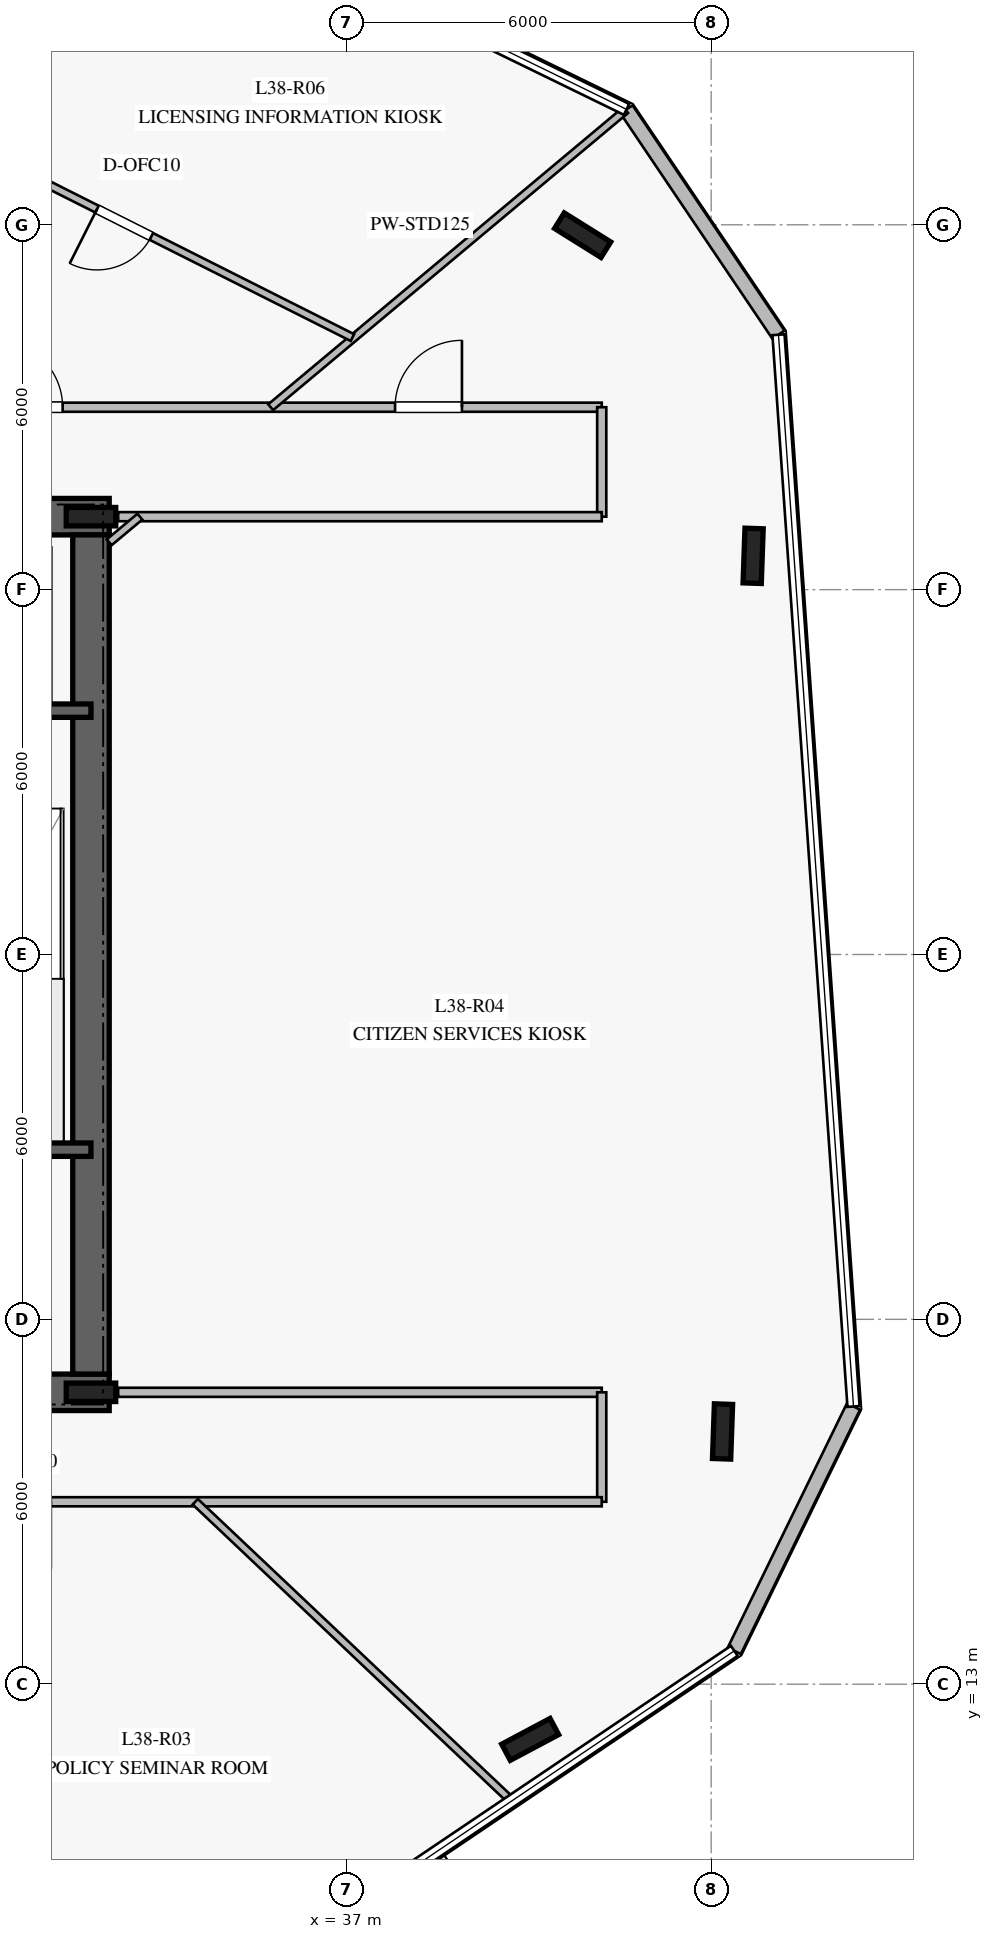
"""IFC4 building model, lengths in metres.
Left out: names, types, materials, properties, quantities, classifications, styles, units other than length and angle.
Written with IfcOpenShell. Run it as: python <this file> out.ifc"""

import sys

from ifc_helpers import new_model, si_unit, direction, frame, frame_2d, origin, origin_2d, place, context, subcontext, project, spatial, rectangle, i_section, extrude, element, fill, save


model = new_model("IFC4")
c1 = context("Model", 3, precision=1e-05, world=origin(), true_north=direction((0.0, 1.0)))
c2 = subcontext(c1, "Body", "Model", "MODEL_VIEW")
j1 = project(units=[si_unit("LENGTHUNIT", "METRE"), si_unit("PLANEANGLEUNIT", "RADIAN")], contexts=[c1])
p1 = place(None, origin())
s1 = spatial("IfcSite", under=j1, at=p1, CompositionType="ELEMENT")
p2 = place(p1, origin())
s2 = spatial("IfcBuilding", under=s1, at=p2, CompositionType="ELEMENT")
p3 = place(p2, frame((0.0, 0.0, 158.4)))
s3 = spatial("IfcBuildingStorey", under=s2, at=p3, CompositionType="ELEMENT", Elevation=158.4)
p4 = place(p3, frame((16.9, 17.8, 0.0), z_axis=(0.0, 0.0, 1.0), x_axis=(1.0, 0.0, 0.0)))
e1 = element("IfcWall", 1, at=p4, inside=s3, PredefinedType="SHEAR", context=c2, shape_type="SweptSolid", body=[
    extrude(rectangle(XDim=16.2, YDim=0.6, at=frame_2d((8.1, 0.0))), origin(), (0.0, 0.0, 1.0), 3.76),
])
p5 = place(p4, frame((5.05, 0.0, 0.0)))
e2 = element("IfcOpeningElement", 2, at=p5, cuts=e1, PredefinedType="OPENING", context=c2, shape_type="SweptSolid", body=[
    extrude(rectangle(XDim=1.2, YDim=2.25, at=frame_2d((0.6, 1.125))), frame((0.0, 0.31, 0.0), z_axis=(0.0, -1.0, 0.0), x_axis=(1.0, 0.0, 0.0)), (0.0, 0.0, 1.0), 0.62),
])
p6 = place(p4, frame((14.0, 0.0, 0.0)))
e3 = element("IfcOpeningElement", 3, at=p6, cuts=e1, PredefinedType="OPENING", context=c2, shape_type="SweptSolid", body=[
    extrude(rectangle(XDim=0.9, YDim=2.1, at=frame_2d((0.45, 1.05))), frame((0.0, 0.31, 0.0), z_axis=(0.0, -1.0, 0.0), x_axis=(1.0, 0.0, 0.0)), (0.0, 0.0, 1.0), 0.62),
])
p7 = place(p4, frame((9.25, 0.0, 0.0)))
e4 = element("IfcOpeningElement", 4, at=p7, cuts=e1, PredefinedType="OPENING", context=c2, shape_type="SweptSolid", body=[
    extrude(rectangle(XDim=1.1, YDim=2.2, at=frame_2d((0.55, 1.1))), frame((0.0, 0.31, 0.0), z_axis=(0.0, -1.0, 0.0), x_axis=(1.0, 0.0, 0.0)), (0.0, 0.0, 1.0), 0.62),
])
p8 = place(p3, frame((33.1, 32.2, 0.0), z_axis=(0.0, 0.0, 1.0), x_axis=(-1.0, 0.0, 0.0)))
e5 = element("IfcWall", 5, at=p8, inside=s3, PredefinedType="SHEAR", context=c2, shape_type="SweptSolid", body=[
    extrude(rectangle(XDim=16.2, YDim=0.6, at=frame_2d((8.1, 0.0))), origin(), (0.0, 0.0, 1.0), 3.76),
])
p9 = place(p8, frame((5.05, 0.0, 0.0)))
e6 = element("IfcOpeningElement", 6, at=p9, cuts=e5, PredefinedType="OPENING", context=c2, shape_type="SweptSolid", body=[
    extrude(rectangle(XDim=1.2, YDim=2.25, at=frame_2d((0.6, 1.125))), frame((0.0, 0.31, 0.0), z_axis=(0.0, -1.0, 0.0), x_axis=(1.0, 0.0, 0.0)), (0.0, 0.0, 1.0), 0.62),
])
p10 = place(p8, frame((11.85, 0.0, 0.0)))
e7 = element("IfcOpeningElement", 7, at=p10, cuts=e5, PredefinedType="OPENING", context=c2, shape_type="SweptSolid", body=[
    extrude(rectangle(XDim=1.1, YDim=2.2, at=frame_2d((0.55, 1.1))), frame((0.0, 0.31, 0.0), z_axis=(0.0, -1.0, 0.0), x_axis=(1.0, 0.0, 0.0)), (0.0, 0.0, 1.0), 0.62),
])
p11 = place(p8, frame((9.875, 0.0, 0.0)))
e8 = element("IfcOpeningElement", 8, at=p11, cuts=e5, PredefinedType="OPENING", context=c2, shape_type="SweptSolid", body=[
    extrude(rectangle(XDim=1.1, YDim=2.2, at=frame_2d((0.55, 1.1))), frame((0.0, 0.31, 0.0), z_axis=(0.0, -1.0, 0.0), x_axis=(1.0, 0.0, 0.0)), (0.0, 0.0, 1.0), 0.62),
])
p12 = place(p8, frame((7.9, 0.0, 0.0)))
e9 = element("IfcOpeningElement", 9, at=p12, cuts=e5, PredefinedType="OPENING", context=c2, shape_type="SweptSolid", body=[
    extrude(rectangle(XDim=1.1, YDim=2.2, at=frame_2d((0.55, 1.1))), frame((0.0, 0.31, 0.0), z_axis=(0.0, -1.0, 0.0), x_axis=(1.0, 0.0, 0.0)), (0.0, 0.0, 1.0), 0.62),
])
p13 = place(p3, frame((32.8, 18.1, 0.0), z_axis=(0.0, 0.0, 1.0), x_axis=(0.0, 1.0, 0.0)))
e10 = element("IfcWall", 10, at=p13, inside=s3, PredefinedType="SHEAR", context=c2, shape_type="SweptSolid", body=[
    extrude(rectangle(XDim=13.8, YDim=0.6, at=frame_2d((6.9, 0.0))), origin(), (0.0, 0.0, 1.0), 3.76),
])
for number, where, z_axis, x_axis in (
    (11, (32.8, 17.8, 0.0), (0.0, 0.0, 1.0), (1.0, 0.0, 0.0)),
    (12, (32.8, 32.2, 0.0), (0.0, 0.0, 1.0), (1.0, 0.0, 0.0)),
):
    element("IfcColumn", number, at=place(p3, frame(where, z_axis=z_axis, x_axis=x_axis)), inside=s3, PredefinedType="COLUMN", context=c2, shape_type="SweptSolid", body=[
        extrude(i_section(OverallWidth=0.303, OverallDepth=0.814, WebThickness=0.021, FlangeThickness=0.04, at=origin_2d()), origin(), (0.0, 0.0, 1.0), 4.0),
    ])
for number, where, z_axis, x_axis in (
    (13, (29.08, 21.79, 0.0), (0.0, 0.0, 1.0), (1.0, 0.0, 0.0)),
    (14, (29.08, 29.01, 0.0), (0.0, 0.0, 1.0), (1.0, 0.0, 0.0)),
):
    element("IfcWall", number, at=place(p3, frame(where, z_axis=z_axis, x_axis=x_axis)), inside=s3, PredefinedType="SOLIDWALL", context=c2, shape_type="SweptSolid", body=[
        extrude(rectangle(XDim=3.72, YDim=0.22, at=frame_2d((1.86, 0.0))), origin(), (0.0, 0.0, 1.0), 3.76),
    ])
for number, where, z_axis, x_axis in (
    (15, (40.886, 36.829, 0.0), (0.0, 0.0, 1.0), (-0.848, 0.53, 0.0)),
    (16, (40.023, 12.092, 0.0), (0.0, 0.0, 1.0), (0.883, 0.469, 0.0)),
    (17, (43.187, 17.156, 0.0), (0.0, 0.0, 1.0), (0.035, 0.999, 0.0)),
    (18, (43.69, 31.556, 0.0), (0.0, 0.0, 1.0), (0.035, 0.999, 0.0)),
):
    element("IfcColumn", number, at=place(p3, frame(where, z_axis=z_axis, x_axis=x_axis)), inside=s3, PredefinedType="COLUMN", context=c2, shape_type="SweptSolid", body=[
        extrude(i_section(OverallWidth=0.3, OverallDepth=0.9, WebThickness=0.019, FlangeThickness=0.035, at=origin_2d()), origin(), (0.0, 0.0, 1.0), 4.0),
    ])
p14 = place(p3, frame((43.38, 13.548, 0.0), z_axis=(0.0, 0.0, 1.0), x_axis=(0.438566687479, 0.898698648399, 0.0)))
e19 = element("IfcWall", 19, at=p14, inside=s3, PredefinedType="STANDARD", context=c2, shape_type="SweptSolid", body=[
    extrude(rectangle(XDim=4.472, YDim=0.24, at=frame_2d((2.236, 0.0))), origin(), (0.0, 0.0, 1.0), 3.76),
])
p15 = place(p3, frame((44.107, 35.192, 0.0), z_axis=(0.0, 0.0, 1.0), x_axis=(-0.559078804203, 0.82911452206, 0.0)))
e20 = element("IfcWall", 20, at=p15, inside=s3, PredefinedType="STANDARD", context=c2, shape_type="SweptSolid", body=[
    extrude(rectangle(XDim=4.47, YDim=0.24, at=frame_2d((2.235, 0.0))), origin(), (0.0, 0.0, 1.0), 3.76),
])
p16 = place(p3, frame((25.95, 34.0, 0.0), z_axis=(0.0, 0.0, 1.0), x_axis=(1.0, 0.0, 0.0)))
e21 = element("IfcWall", 21, at=p16, inside=s3, PredefinedType="PARTITIONING", context=c2, shape_type="SweptSolid", body=[
    extrude(rectangle(XDim=15.25, YDim=0.15, at=frame_2d((7.625, 0.0))), origin(), (0.0, 0.0, 1.0), 3.21),
])
p17 = place(p16, frame((11.851, 0.0, 0.0)))
e22 = element("IfcOpeningElement", 22, at=p17, cuts=e21, PredefinedType="OPENING", context=c2, shape_type="SweptSolid", body=[
    extrude(rectangle(XDim=1.1, YDim=2.2, at=frame_2d((0.55, 1.1))), frame((0.0, 0.085, 0.0), z_axis=(0.0, -1.0, 0.0), x_axis=(1.0, 0.0, 0.0)), (0.0, 0.0, 1.0), 0.17),
])
p18 = place(p16, frame((5.284, 0.0, 0.0)))
e23 = element("IfcOpeningElement", 23, at=p18, cuts=e21, PredefinedType="OPENING", context=c2, shape_type="SweptSolid", body=[
    extrude(rectangle(XDim=1.1, YDim=2.2, at=frame_2d((0.55, 1.1))), frame((0.0, 0.085, 0.0), z_axis=(0.0, -1.0, 0.0), x_axis=(1.0, 0.0, 0.0)), (0.0, 0.0, 1.0), 0.17),
])
p19 = place(p3, frame((41.2, 34.0, 0.0), z_axis=(0.0, 0.0, 1.0), x_axis=(0.0, -1.0, 0.0)))
e24 = element("IfcWall", 24, at=p19, inside=s3, PredefinedType="PARTITIONING", context=c2, shape_type="SweptSolid", body=[
    extrude(rectangle(XDim=1.8, YDim=0.15, at=frame_2d((0.9, 0.0))), origin(), (0.0, 0.0, 1.0), 3.76),
])
p20 = place(p3, frame((41.2, 32.2, 0.0), z_axis=(0.0, 0.0, 1.0), x_axis=(-1.0, 0.0, 0.0)))
e25 = element("IfcWall", 25, at=p20, inside=s3, PredefinedType="PARTITIONING", context=c2, shape_type="SweptSolid", body=[
    extrude(rectangle(XDim=7.953, YDim=0.15, at=frame_2d((3.977, 0.0))), origin(), (0.0, 0.0, 1.0), 3.21),
])
p21 = place(p3, frame((33.247, 17.8, 0.0), z_axis=(0.0, 0.0, 1.0), x_axis=(1.0, 0.0, 0.0)))
e26 = element("IfcWall", 26, at=p21, inside=s3, PredefinedType="PARTITIONING", context=c2, shape_type="SweptSolid", body=[
    extrude(rectangle(XDim=7.953, YDim=0.15, at=frame_2d((3.977, 0.0))), origin(), (0.0, 0.0, 1.0), 3.05),
])
p22 = place(p3, frame((41.2, 17.8, 0.0), z_axis=(0.0, 0.0, 1.0), x_axis=(0.0, -1.0, 0.0)))
e27 = element("IfcWall", 27, at=p22, inside=s3, PredefinedType="PARTITIONING", context=c2, shape_type="SweptSolid", body=[
    extrude(rectangle(XDim=1.8, YDim=0.15, at=frame_2d((0.9, 0.0))), origin(), (0.0, 0.0, 1.0), 3.21),
])
p23 = place(p3, frame((41.2, 16.0, 0.0), z_axis=(0.0, 0.0, 1.0), x_axis=(-1.0, 0.0, 0.0)))
e28 = element("IfcWall", 28, at=p23, inside=s3, PredefinedType="PARTITIONING", context=c2, shape_type="SweptSolid", body=[
    extrude(rectangle(XDim=15.25, YDim=0.15, at=frame_2d((7.625, 0.0))), origin(), (0.0, 0.0, 1.0), 3.21),
])
p24 = place(p23, frame((13.129, 0.0, 0.0)))
e29 = element("IfcOpeningElement", 29, at=p24, cuts=e28, PredefinedType="OPENING", context=c2, shape_type="SweptSolid", body=[
    extrude(rectangle(XDim=1.1, YDim=2.2, at=frame_2d((0.55, 1.1))), frame((0.0, 0.085, 0.0), z_axis=(0.0, -1.0, 0.0), x_axis=(1.0, 0.0, 0.0)), (0.0, 0.0, 1.0), 0.17),
])
p25 = place(p23, frame((9.06, 0.0, 0.0)))
e30 = element("IfcOpeningElement", 30, at=p25, cuts=e28, PredefinedType="OPENING", context=c2, shape_type="SweptSolid", body=[
    extrude(rectangle(XDim=1.1, YDim=2.2, at=frame_2d((0.55, 1.1))), frame((0.0, 0.085, 0.0), z_axis=(0.0, -1.0, 0.0), x_axis=(1.0, 0.0, 0.0)), (0.0, 0.0, 1.0), 0.17),
])
p26 = place(p3, frame((33.1, 31.779, 0.0), z_axis=(0.0, 0.0, 1.0), x_axis=(0.76748927859, 0.641061781148, 0.0)))
e31 = element("IfcWall", 31, at=p26, inside=s3, PredefinedType="PARTITIONING", context=c2, shape_type="SweptSolid", body=[
    extrude(rectangle(XDim=0.656, YDim=0.125, at=frame_2d((0.328, 0.0))), origin(), (0.0, 0.0, 1.0), 3.21),
])
p27 = place(p3, frame((35.755, 34.0, 0.0), z_axis=(0.0, 0.0, 1.0), x_axis=(0.766871091206, 0.641801160386, 0.0)))
e32 = element("IfcWall", 32, at=p27, inside=s3, PredefinedType="PARTITIONING", context=c2, shape_type="SweptSolid", body=[
    extrude(rectangle(XDim=7.613, YDim=0.125, at=frame_2d((3.807, 0.0))), origin(), (0.0, 0.0, 1.0), 3.16),
])
p28 = place(p3, frame((28.528, 16.0, 0.0), z_axis=(0.0, 0.0, 1.0), x_axis=(0.364981599364, -0.931014732496, 0.0)))
e33 = element("IfcWall", 33, at=p28, inside=s3, PredefinedType="PARTITIONING", context=c2, shape_type="SweptSolid", body=[
    extrude(rectangle(XDim=10.575, YDim=0.125, at=frame_2d((5.288, 0.0))), origin(), (0.0, 0.0, 1.0), 3.16),
])
p29 = place(p3, frame((34.515, 16.0, 0.0), z_axis=(0.0, 0.0, 1.0), x_axis=(0.726513595086, -0.687152090992, 0.0)))
e34 = element("IfcWall", 34, at=p29, inside=s3, PredefinedType="PARTITIONING", context=c2, shape_type="SweptSolid", body=[
    extrude(rectangle(XDim=7.145, YDim=0.125, at=frame_2d((3.573, 0.0))), origin(), (0.0, 0.0, 1.0), 3.16),
])
p30 = place(p3, frame((37.1, 35.145, 0.0), z_axis=(0.0, 0.0, 1.0), x_axis=(-0.893377857621, 0.449306135628, 0.0)))
e35 = element("IfcWall", 35, at=p30, inside=s3, PredefinedType="PARTITIONING", context=c2, shape_type="SweptSolid", body=[
    extrude(rectangle(XDim=8.582, YDim=0.125, at=frame_2d((4.291, 0.0))), origin(), (0.0, 0.0, 1.0), 3.21),
])
p31 = place(p30, frame((3.702, 0.0, 0.0)))
e36 = element("IfcOpeningElement", 36, at=p31, cuts=e35, PredefinedType="OPENING", context=c2, shape_type="SweptSolid", body=[
    extrude(rectangle(XDim=1.0, YDim=2.15, at=frame_2d((0.5, 1.075))), frame((0.0, 0.073, 0.0), z_axis=(0.0, -1.0, 0.0), x_axis=(1.0, 0.0, 0.0)), (0.0, 0.0, 1.0), 0.145),
])
p32 = place(p17, origin())
e37 = element("IfcDoor", 37, at=p32, inside=s3, OperationType="SINGLE_SWING_RIGHT", PredefinedType="DOOR", context=c2, shape_type="SweptSolid", body=[
    extrude(rectangle(XDim=1.1, YDim=2.2, at=frame_2d((0.55, 1.1))), frame((0.0, 0.025, 0.0), z_axis=(0.0, -1.0, 0.0), x_axis=(1.0, 0.0, 0.0)), (0.0, 0.0, 1.0), 0.05),
])
fill(e22, e37)
p33 = place(p18, origin())
e38 = element("IfcDoor", 38, at=p33, inside=s3, OperationType="SINGLE_SWING_LEFT", PredefinedType="DOOR", context=c2, shape_type="SweptSolid", body=[
    extrude(rectangle(XDim=1.1, YDim=2.2, at=frame_2d((0.55, 1.1))), frame((0.0, 0.025, 0.0), z_axis=(0.0, -1.0, 0.0), x_axis=(1.0, 0.0, 0.0)), (0.0, 0.0, 1.0), 0.05),
])
fill(e23, e38)
p34 = place(p31, origin())
e39 = element("IfcDoor", 39, at=p34, inside=s3, OperationType="SINGLE_SWING_RIGHT", PredefinedType="DOOR", context=c2, shape_type="SweptSolid", body=[
    extrude(rectangle(XDim=1.0, YDim=2.15, at=frame_2d((0.5, 1.075))), frame((0.0, 0.025, 0.0), z_axis=(0.0, -1.0, 0.0), x_axis=(1.0, 0.0, 0.0)), (0.0, 0.0, 1.0), 0.05),
])
fill(e36, e39)
save(model, sys.argv[1])
